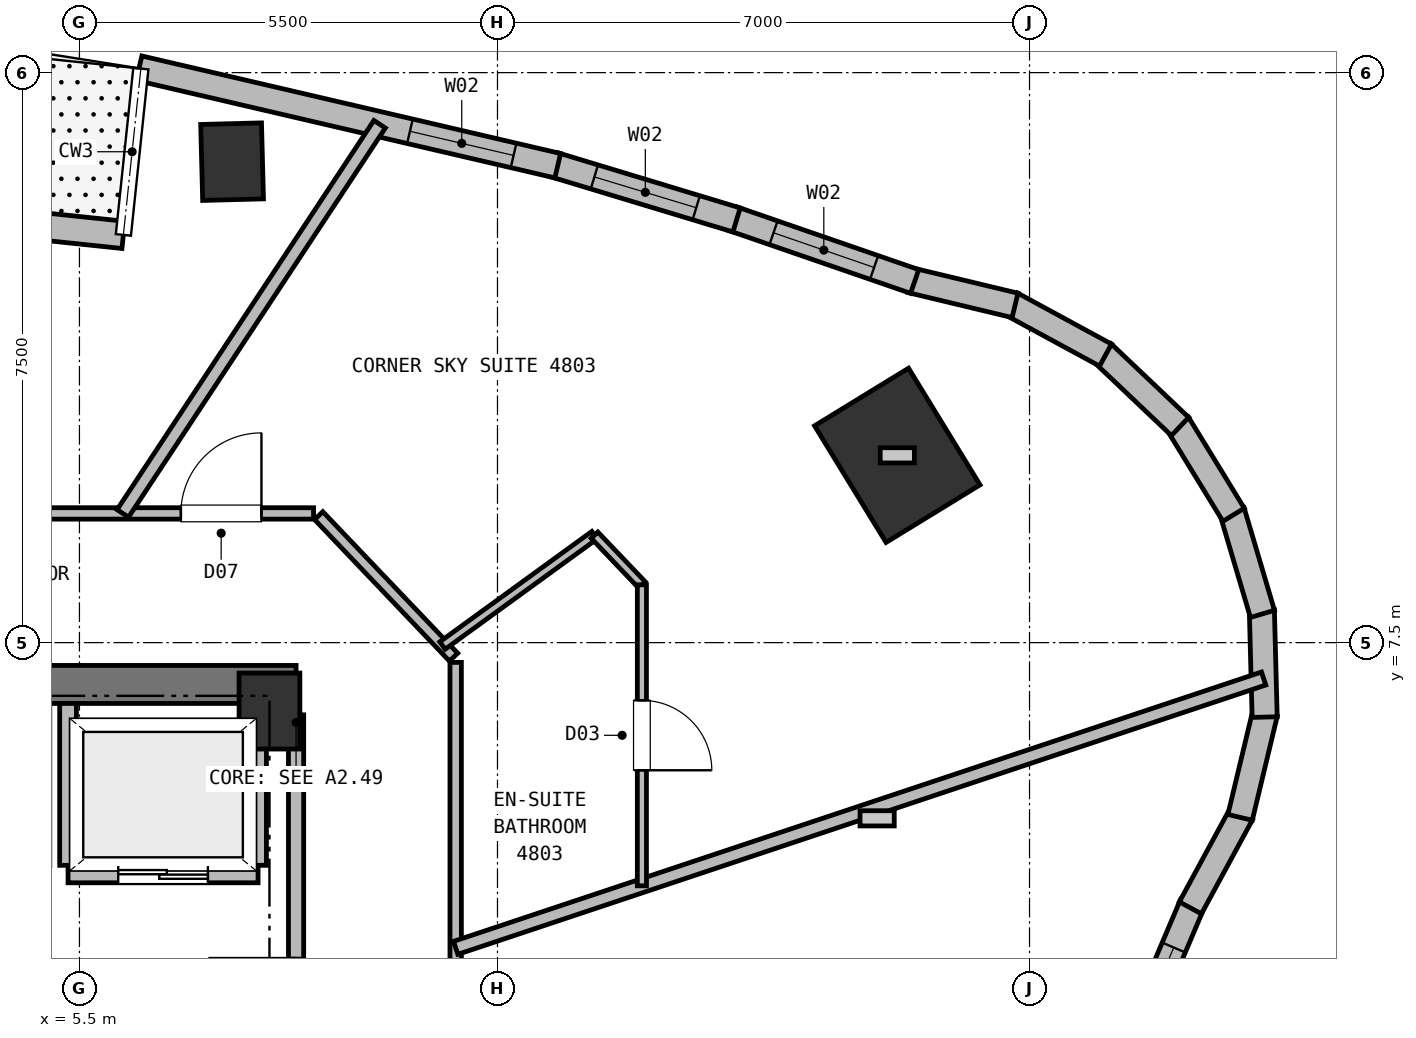
"""IFC4 building model, lengths in metres.
Left out: names, types, materials, properties, quantities, classifications, styles, units other than length and angle.
Written with IfcOpenShell. Run it as: python <this file> out.ifc"""

import sys

from ifc_helpers import new_model, si_unit, direction, frame, frame_2d, origin, origin_2d, place, context, subcontext, project, spatial, rectangle, extrude, element, fill, save


model = new_model("IFC4")
c1 = context("Model", 3, precision=1e-05, world=origin(), true_north=direction((0.0, 1.0)))
c2 = subcontext(c1, "Body", "Model", "MODEL_VIEW")
j1 = project(units=[si_unit("LENGTHUNIT", "METRE"), si_unit("PLANEANGLEUNIT", "RADIAN")], contexts=[c1])
p1 = place(None, origin())
s1 = spatial("IfcSite", under=j1, at=p1, CompositionType="ELEMENT")
p2 = place(p1, origin())
s2 = spatial("IfcBuilding", under=s1, at=p2, CompositionType="ELEMENT")
p3 = place(p2, frame((0.0, 0.0, 182.75)))
s3 = spatial("IfcBuildingStorey", under=s2, at=p3, CompositionType="ELEMENT", Elevation=182.75)
p4 = place(p3, frame((8.0, 6.6, 0.0), z_axis=(0.0, 0.0, 1.0), x_axis=(1.0, 0.0, 0.0)))
e1 = element("IfcColumn", 1, at=p4, inside=s3, PredefinedType="COLUMN", context=c2, shape_type="SweptSolid", body=[
    extrude(rectangle(XDim=0.8, YDim=1.0, at=origin_2d()), origin(), (0.0, 0.0, 1.0), 3.8),
])
p5 = place(p3, frame((-8.35, 6.95, 0.0), z_axis=(0.0, 0.0, 1.0), x_axis=(1.0, 0.0, 0.0)))
e2 = element("IfcWall", 2, at=p5, inside=s3, PredefinedType="SHEAR", context=c2, shape_type="SweptSolid", body=[
    extrude(rectangle(XDim=16.7, YDim=0.5, at=frame_2d((8.35, 0.0))), origin(), (0.0, 0.0, 1.0), 3.55),
])
p6 = place(p3, frame((16.26, 9.964, 0.0), z_axis=(0.0, 0.0, 1.0), x_axis=(0.852640164354, 0.522498564716, 0.0)))
e3 = element("IfcColumn", 3, at=p6, inside=s3, PredefinedType="COLUMN", context=c2, shape_type="SweptSolid", body=[
    extrude(rectangle(XDim=1.45, YDim=1.8, at=origin_2d()), origin(), (0.0, 0.0, 1.0), 3.8),
])
p7 = place(p3, frame((7.508, 13.828, 0.0), z_axis=(0.0, 0.0, 1.0), x_axis=(0.999657324976, 0.026176948308, 0.0)))
e4 = element("IfcColumn", 4, at=p7, inside=s3, PredefinedType="COLUMN", context=c2, shape_type="SweptSolid", body=[
    extrude(rectangle(XDim=0.8, YDim=1.0, at=origin_2d()), origin(), (0.0, 0.0, 1.0), 3.8),
])
p8 = place(p3, frame((-3.271, 13.848, 0.0), z_axis=(0.0, 0.0, 1.0), x_axis=(0.994520954065, -0.104537418785, 0.0)))
e5 = element("IfcWall", 5, at=p8, inside=s3, PredefinedType="SOLIDWALL", context=c2, shape_type="SweptSolid", body=[
    extrude(rectangle(XDim=9.4, YDim=0.36, at=frame_2d((4.7, 0.0))), origin(), (0.0, 0.0, 1.0), 3.55),
])
p9 = place(p8, frame((3.875, 0.0, 0.0)))
e6 = element("IfcOpeningElement", 6, at=p9, cuts=e5, PredefinedType="OPENING", context=c2, shape_type="SweptSolid", body=[
    extrude(rectangle(XDim=1.65, YDim=2.25, at=frame_2d((0.825, 1.125))), frame((0.0, 0.19, 0.0), z_axis=(0.0, -1.0, 0.0), x_axis=(1.0, 0.0, 0.0)), (0.0, 0.0, 1.0), 0.38),
])
p10 = place(p3, frame((20.138, 4.055, 0.0), z_axis=(0.0, 0.0, 1.0), x_axis=(-0.390838099147, -0.920459439766, 0.0)))
e7 = element("IfcWall", 7, at=p10, inside=s3, PredefinedType="SOLIDWALL", context=c2, shape_type="SweptSolid", body=[
    extrude(rectangle(XDim=2.632, YDim=0.33, at=frame_2d((1.316, 0.0))), origin(), (0.0, 0.0, 1.0), 3.55),
])
p11 = place(p10, frame((0.616, 0.0, 0.72)))
e8 = element("IfcOpeningElement", 8, at=p11, cuts=e7, PredefinedType="OPENING", context=c2, shape_type="SweptSolid", body=[
    extrude(rectangle(XDim=1.4, YDim=1.84, at=frame_2d((0.7, 0.92))), frame((0.0, 0.175, 0.0), z_axis=(0.0, -1.0, 0.0), x_axis=(1.0, 0.0, 0.0)), (0.0, 0.0, 1.0), 0.35),
])
p12 = place(p3, frame((20.788, 5.247, 0.0), z_axis=(0.0, 0.0, 1.0), x_axis=(-0.477137792558, -0.878828496871, 0.0)))
e9 = element("IfcWall", 9, at=p12, inside=s3, PredefinedType="SOLIDWALL", context=c2, shape_type="SweptSolid", body=[
    extrude(rectangle(XDim=1.408, YDim=0.33, at=frame_2d((0.704, 0.0))), origin(), (0.0, 0.0, 1.0), 3.55),
])
for number, where, z_axis, x_axis in (
    (10, (21.099, 6.57, 0.0), (0.0, 0.0, 1.0), (-0.233, -0.972, 0.0)),
    (11, (21.057, 7.927, 0.0), (0.0, 0.0, 1.0), (0.026, -1.0, 0.0)),
):
    element("IfcWall", number, at=place(p3, frame(where, z_axis=z_axis, x_axis=x_axis)), inside=s3, PredefinedType="SOLIDWALL", context=c2, shape_type="SweptSolid", body=[
        extrude(rectangle(XDim=1.407, YDim=0.33, at=frame_2d((0.704, 0.0))), origin(), (0.0, 0.0, 1.0), 3.55),
    ])
p13 = place(p3, frame((20.665, 9.228, 0.0), z_axis=(0.0, 0.0, 1.0), x_axis=(0.284100140437, -0.958794613149, 0.0)))
e12 = element("IfcWall", 12, at=p13, inside=s3, PredefinedType="SOLIDWALL", context=c2, shape_type="SweptSolid", body=[
    extrude(rectangle(XDim=1.408, YDim=0.33, at=frame_2d((0.704, 0.0))), origin(), (0.0, 0.0, 1.0), 3.55),
])
for number, where, z_axis, x_axis in (
    (13, (19.95, 10.383, 0.0), (0.0, 0.0, 1.0), (0.523, -0.853, 0.0)),
    (14, (18.96, 11.313, 0.0), (0.0, 0.0, 1.0), (0.725, -0.688, 0.0)),
):
    element("IfcWall", number, at=place(p3, frame(where, z_axis=z_axis, x_axis=x_axis)), inside=s3, PredefinedType="SOLIDWALL", context=c2, shape_type="SweptSolid", body=[
        extrude(rectangle(XDim=1.407, YDim=0.33, at=frame_2d((0.704, 0.0))), origin(), (0.0, 0.0, 1.0), 3.55),
    ])
p14 = place(p3, frame((17.763, 11.955, 0.0), z_axis=(0.0, 0.0, 1.0), x_axis=(0.8789012206, -0.47700382014, 0.0)))
e15 = element("IfcWall", 15, at=p14, inside=s3, PredefinedType="SOLIDWALL", context=c2, shape_type="SweptSolid", body=[
    extrude(rectangle(XDim=1.407, YDim=0.33, at=frame_2d((0.704, 0.0))), origin(), (0.0, 0.0, 1.0), 3.55),
])
p15 = place(p3, frame((16.441, 12.266, 0.0), z_axis=(0.0, 0.0, 1.0), x_axis=(0.972355799013, -0.23350417582, 0.0)))
e16 = element("IfcWall", 16, at=p15, inside=s3, PredefinedType="SOLIDWALL", context=c2, shape_type="SweptSolid", body=[
    extrude(rectangle(XDim=1.407, YDim=0.33, at=frame_2d((0.704, 0.0))), origin(), (0.0, 0.0, 1.0), 3.55),
])
p16 = place(p3, frame((14.098, 13.077, 0.0), z_axis=(0.0, 0.0, 1.0), x_axis=(0.945270347183, -0.326288171311, 0.0)))
e17 = element("IfcWall", 17, at=p16, inside=s3, PredefinedType="SOLIDWALL", context=c2, shape_type="SweptSolid", body=[
    extrude(rectangle(XDim=2.529, YDim=0.33, at=frame_2d((1.265, 0.0))), origin(), (0.0, 0.0, 1.0), 3.55),
])
p17 = place(p16, frame((0.564, 0.0, 0.72)))
e18 = element("IfcOpeningElement", 18, at=p17, cuts=e17, PredefinedType="OPENING", context=c2, shape_type="SweptSolid", body=[
    extrude(rectangle(XDim=1.4, YDim=1.84, at=frame_2d((0.7, 0.92))), frame((0.0, 0.175, 0.0), z_axis=(0.0, -1.0, 0.0), x_axis=(1.0, 0.0, 0.0)), (0.0, 0.0, 1.0), 0.35),
])
p18 = place(p3, frame((11.744, 13.788, 0.0), z_axis=(0.0, 0.0, 1.0), x_axis=(0.957175686943, -0.289507693031, 0.0)))
e19 = element("IfcWall", 19, at=p18, inside=s3, PredefinedType="SOLIDWALL", context=c2, shape_type="SweptSolid", body=[
    extrude(rectangle(XDim=2.509, YDim=0.33, at=frame_2d((1.254, 0.0))), origin(), (0.0, 0.0, 1.0), 3.55),
])
p19 = place(p18, frame((0.554, 0.0, 0.72)))
e20 = element("IfcOpeningElement", 20, at=p19, cuts=e19, PredefinedType="OPENING", context=c2, shape_type="SweptSolid", body=[
    extrude(rectangle(XDim=1.4, YDim=1.84, at=frame_2d((0.7, 0.92))), frame((0.0, 0.175, 0.0), z_axis=(0.0, -1.0, 0.0), x_axis=(1.0, 0.0, 0.0)), (0.0, 0.0, 1.0), 0.35),
])
p20 = place(p3, frame((6.284, 15.059, 0.0), z_axis=(0.0, 0.0, 1.0), x_axis=(0.973919150731, -0.226895323527, 0.0)))
e21 = element("IfcWall", 21, at=p20, inside=s3, PredefinedType="SOLIDWALL", context=c2, shape_type="SweptSolid", body=[
    extrude(rectangle(XDim=5.656, YDim=0.33, at=frame_2d((2.828, 0.0))), origin(), (0.0, 0.0, 1.0), 3.55),
])
p21 = place(p20, frame((3.66, 0.0, 0.72)))
e22 = element("IfcOpeningElement", 22, at=p21, cuts=e21, PredefinedType="OPENING", context=c2, shape_type="SweptSolid", body=[
    extrude(rectangle(XDim=1.4, YDim=1.88, at=frame_2d((0.7, 0.94))), frame((0.0, 0.175, 0.0), z_axis=(0.0, -1.0, 0.0), x_axis=(1.0, 0.0, 0.0)), (0.0, 0.0, 1.0), 0.35),
])
p22 = place(p3, frame((5.35, 4.45, 0.0), z_axis=(0.0, 0.0, 1.0), x_axis=(1.0, 0.0, 0.0)))
e23 = element("IfcWall", 23, at=p22, inside=s3, PredefinedType="PARTITIONING", context=c2, shape_type="SweptSolid", body=[
    extrude(rectangle(XDim=2.5, YDim=0.22, at=frame_2d((1.25, 0.0))), origin(), (0.0, 0.0, 1.0), 3.55),
])
p23 = place(p22, frame((0.66, 0.0, 0.0)))
e24 = element("IfcOpeningElement", 24, at=p23, cuts=e23, PredefinedType="OPENING", context=c2, shape_type="SweptSolid", body=[
    extrude(rectangle(XDim=1.18, YDim=2.15, at=frame_2d((0.59, 1.075))), frame((0.0, 0.12, 0.0), z_axis=(0.0, -1.0, 0.0), x_axis=(1.0, 0.0, 0.0)), (0.0, 0.0, 1.0), 0.24),
])
p24 = place(p3, frame((5.35, 4.57, 0.0), z_axis=(0.0, 0.0, 1.0), x_axis=(0.0, 1.0, 0.0)))
e25 = element("IfcWall", 25, at=p24, inside=s3, PredefinedType="PARTITIONING", context=c2, shape_type="SweptSolid", body=[
    extrude(rectangle(XDim=2.13, YDim=0.22, at=frame_2d((1.065, 0.0))), origin(), (0.0, 0.0, 1.0), 3.55),
])
p25 = place(p3, frame((7.85, 4.57, 0.0), z_axis=(0.0, 0.0, 1.0), x_axis=(0.0, 1.0, 0.0)))
e26 = element("IfcWall", 26, at=p25, inside=s3, PredefinedType="PARTITIONING", context=c2, shape_type="SweptSolid", body=[
    extrude(rectangle(XDim=2.13, YDim=0.22, at=frame_2d((1.065, 0.0))), origin(), (0.0, 0.0, 1.0), 3.18),
])
p26 = place(p3, frame((8.35, 1.25, 0.0), z_axis=(0.0, 0.0, 1.0), x_axis=(0.0, 1.0, 0.0)))
e27 = element("IfcWall", 27, at=p26, inside=s3, PredefinedType="PARTITIONING", context=c2, shape_type="SweptSolid", body=[
    extrude(rectangle(XDim=5.3, YDim=0.2, at=frame_2d((2.65, 0.0))), origin(), (0.0, 0.0, 1.0), 3.55),
])
p27 = place(p26, frame((0.95, 0.0, 0.0)))
e28 = element("IfcOpeningElement", 28, at=p27, cuts=e27, PredefinedType="OPENING", context=c2, shape_type="SweptSolid", body=[
    extrude(rectangle(XDim=1.15, YDim=2.15, at=frame_2d((0.575, 1.075))), frame((0.0, 0.11, 0.0), z_axis=(0.0, -1.0, 0.0), x_axis=(1.0, 0.0, 0.0)), (0.0, 0.0, 1.0), 0.22),
])
p28 = place(p3, frame((10.45, 7.24, 0.0), z_axis=(0.0, 0.0, 1.0), x_axis=(0.0, -1.0, 0.0)))
e29 = element("IfcWall", 29, at=p28, inside=s3, PredefinedType="PARTITIONING", context=c2, shape_type="SweptSolid", body=[
    extrude(rectangle(XDim=14.48, YDim=0.15, at=frame_2d((7.24, 0.0))), origin(), (0.0, 0.0, 1.0), 3.55),
])
p29 = place(p28, frame((11.674, 0.0, 0.0)))
e30 = element("IfcOpeningElement", 30, at=p29, cuts=e29, PredefinedType="OPENING", context=c2, shape_type="SweptSolid", body=[
    extrude(rectangle(XDim=1.06, YDim=2.15, at=frame_2d((0.53, 1.075))), frame((0.0, 0.085, 0.0), z_axis=(0.0, -1.0, 0.0), x_axis=(1.0, 0.0, 0.0)), (0.0, 0.0, 1.0), 0.17),
])
p30 = place(p28, frame((5.006, 0.0, 0.0)))
e31 = element("IfcOpeningElement", 31, at=p30, cuts=e29, PredefinedType="OPENING", context=c2, shape_type="SweptSolid", body=[
    extrude(rectangle(XDim=1.0, YDim=2.15, at=frame_2d((0.5, 1.075))), frame((0.0, 0.085, 0.0), z_axis=(0.0, -1.0, 0.0), x_axis=(1.0, 0.0, 0.0)), (0.0, 0.0, 1.0), 0.17),
])
p31 = place(p3, frame((8.648, 9.171, 0.0), z_axis=(0.0, 0.0, 1.0), x_axis=(0.689960858356, -0.723846678473, 0.0)))
e32 = element("IfcWall", 32, at=p31, inside=s3, PredefinedType="PARTITIONING", context=c2, shape_type="SweptSolid", body=[
    extrude(rectangle(XDim=2.572, YDim=0.15, at=frame_2d((1.286, 0.0))), origin(), (0.0, 0.0, 1.0), 3.55),
])
p32 = place(p3, frame((-8.58, 9.2, 0.0), z_axis=(0.0, 0.0, 1.0), x_axis=(1.0, 0.0, 0.0)))
e33 = element("IfcWall", 33, at=p32, inside=s3, PredefinedType="PARTITIONING", context=c2, shape_type="SweptSolid", body=[
    extrude(rectangle(XDim=17.16, YDim=0.15, at=frame_2d((8.58, 0.0))), origin(), (0.0, 0.0, 1.0), 3.55),
])
p33 = place(p32, frame((9.371, 0.0, 0.0)))
e34 = element("IfcOpeningElement", 34, at=p33, cuts=e33, PredefinedType="OPENING", context=c2, shape_type="SweptSolid", body=[
    extrude(rectangle(XDim=1.0, YDim=2.15, at=frame_2d((0.5, 1.075))), frame((0.0, 0.085, 0.0), z_axis=(0.0, -1.0, 0.0), x_axis=(1.0, 0.0, 0.0)), (0.0, 0.0, 1.0), 0.17),
])
p34 = place(p32, frame((15.415, 0.0, 0.0)))
e35 = element("IfcOpeningElement", 35, at=p34, cuts=e33, PredefinedType="OPENING", context=c2, shape_type="SweptSolid", body=[
    extrude(rectangle(XDim=1.06, YDim=2.15, at=frame_2d((0.53, 1.075))), frame((0.0, 0.085, 0.0), z_axis=(0.0, -1.0, 0.0), x_axis=(1.0, 0.0, 0.0)), (0.0, 0.0, 1.0), 0.17),
])
p35 = place(p3, frame((10.45, 3.484, 0.0), z_axis=(0.0, 0.0, 1.0), x_axis=(0.94867676156, 0.316247374812, 0.0)))
e36 = element("IfcWall", 36, at=p35, inside=s3, PredefinedType="PARTITIONING", context=c2, shape_type="SweptSolid", body=[
    extrude(rectangle(XDim=11.206, YDim=0.18, at=frame_2d((5.603, 0.0))), origin(), (0.0, 0.0, 1.0), 3.55),
])
p36 = place(p3, frame((12.277, 8.914, 0.0), z_axis=(0.0, 0.0, 1.0), x_axis=(-0.809184297192, -0.587554910777, 0.0)))
e37 = element("IfcWall", 37, at=p36, inside=s3, PredefinedType="PARTITIONING", context=c2, shape_type="SweptSolid", body=[
    extrude(rectangle(XDim=2.472, YDim=0.12, at=frame_2d((1.236, 0.0))), origin(), (0.0, 0.0, 1.0), 3.55),
])
p37 = place(p3, frame((12.277, 8.914, 0.0), z_axis=(0.0, 0.0, 1.0), x_axis=(0.689871145132, -0.723932181295, 0.0)))
e38 = element("IfcWall", 38, at=p37, inside=s3, PredefinedType="PARTITIONING", context=c2, shape_type="SweptSolid", body=[
    extrude(rectangle(XDim=0.903, YDim=0.12, at=frame_2d((0.452, 0.0))), origin(), (0.0, 0.0, 1.0), 3.55),
])
p38 = place(p3, frame((12.9, 8.26, 0.0), z_axis=(0.0, 0.0, 1.0), x_axis=(0.0, -1.0, 0.0)))
e39 = element("IfcWall", 39, at=p38, inside=s3, PredefinedType="PARTITIONING", context=c2, shape_type="SweptSolid", body=[
    extrude(rectangle(XDim=3.96, YDim=0.12, at=frame_2d((1.98, 0.0))), origin(), (0.0, 0.0, 1.0), 3.55),
])
p39 = place(p38, frame((1.52, 0.0, 0.0)))
e40 = element("IfcOpeningElement", 40, at=p39, cuts=e39, PredefinedType="OPENING", context=c2, shape_type="SweptSolid", body=[
    extrude(rectangle(XDim=0.92, YDim=2.1, at=frame_2d((0.46, 1.05))), frame((0.0, 0.07, 0.0), z_axis=(0.0, -1.0, 0.0), x_axis=(1.0, 0.0, 0.0)), (0.0, 0.0, 1.0), 0.14),
])
p40 = place(p3, frame((6.07, 9.2, 0.0), z_axis=(0.0, 0.0, 1.0), x_axis=(0.550708603457, 0.834697570428, 0.0)))
e41 = element("IfcWall", 41, at=p40, inside=s3, PredefinedType="PARTITIONING", context=c2, shape_type="SweptSolid", body=[
    extrude(rectangle(XDim=6.135, YDim=0.18, at=frame_2d((3.068, 0.0))), origin(), (0.0, 0.0, 1.0), 3.55),
])
p41 = place(p11, origin())
e42 = element("IfcWindow", 42, at=p41, inside=s3, PartitioningType="SINGLE_PANEL", PredefinedType="WINDOW", context=c2, shape_type="SweptSolid", body=[
    extrude(rectangle(XDim=1.4, YDim=1.84, at=frame_2d((0.7, 0.92))), frame((0.0, 0.03, 0.0), z_axis=(0.0, -1.0, 0.0), x_axis=(1.0, 0.0, 0.0)), (0.0, 0.0, 1.0), 0.06),
])
fill(e8, e42)
p42 = place(p17, origin())
e43 = element("IfcWindow", 43, at=p42, inside=s3, PartitioningType="SINGLE_PANEL", PredefinedType="WINDOW", context=c2, shape_type="SweptSolid", body=[
    extrude(rectangle(XDim=1.4, YDim=1.84, at=frame_2d((0.7, 0.92))), frame((0.0, 0.03, 0.0), z_axis=(0.0, -1.0, 0.0), x_axis=(1.0, 0.0, 0.0)), (0.0, 0.0, 1.0), 0.06),
])
fill(e18, e43)
p43 = place(p19, origin())
e44 = element("IfcWindow", 44, at=p43, inside=s3, PartitioningType="SINGLE_PANEL", PredefinedType="WINDOW", context=c2, shape_type="SweptSolid", body=[
    extrude(rectangle(XDim=1.4, YDim=1.84, at=frame_2d((0.7, 0.92))), frame((0.0, 0.03, 0.0), z_axis=(0.0, -1.0, 0.0), x_axis=(1.0, 0.0, 0.0)), (0.0, 0.0, 1.0), 0.06),
])
fill(e20, e44)
p44 = place(p21, origin())
e45 = element("IfcWindow", 45, at=p44, inside=s3, PartitioningType="SINGLE_PANEL", PredefinedType="WINDOW", context=c2, shape_type="SweptSolid", body=[
    extrude(rectangle(XDim=1.4, YDim=1.88, at=frame_2d((0.7, 0.94))), frame((0.0, 0.03, 0.0), z_axis=(0.0, -1.0, 0.0), x_axis=(1.0, 0.0, 0.0)), (0.0, 0.0, 1.0), 0.06),
])
fill(e22, e45)
p45 = place(p23, origin())
e46 = element("IfcDoor", 46, at=p45, inside=s3, OperationType="DOUBLE_DOOR_SLIDING", PredefinedType="DOOR", context=c2, shape_type="SweptSolid", body=[
    extrude(rectangle(XDim=1.18, YDim=2.15, at=frame_2d((0.59, 1.075))), frame((0.0, 0.025, 0.0), z_axis=(0.0, -1.0, 0.0), x_axis=(1.0, 0.0, 0.0)), (0.0, 0.0, 1.0), 0.05),
])
fill(e24, e46)
p46 = place(p39, origin())
e47 = element("IfcDoor", 47, at=p46, inside=s3, OperationType="SINGLE_SWING_RIGHT", PredefinedType="DOOR", context=c2, shape_type="SweptSolid", body=[
    extrude(rectangle(XDim=0.92, YDim=2.1, at=frame_2d((0.46, 1.05))), frame((0.0, 0.025, 0.0), z_axis=(0.0, -1.0, 0.0), x_axis=(1.0, 0.0, 0.0)), (0.0, 0.0, 1.0), 0.05),
])
fill(e40, e47)
p47 = place(p34, origin())
e48 = element("IfcDoor", 48, at=p47, inside=s3, OperationType="SINGLE_SWING_RIGHT", PredefinedType="DOOR", context=c2, shape_type="SweptSolid", body=[
    extrude(rectangle(XDim=1.06, YDim=2.15, at=frame_2d((0.53, 1.075))), frame((0.0, 0.025, 0.0), z_axis=(0.0, -1.0, 0.0), x_axis=(1.0, 0.0, 0.0)), (0.0, 0.0, 1.0), 0.05),
])
fill(e35, e48)
save(model, sys.argv[1])
